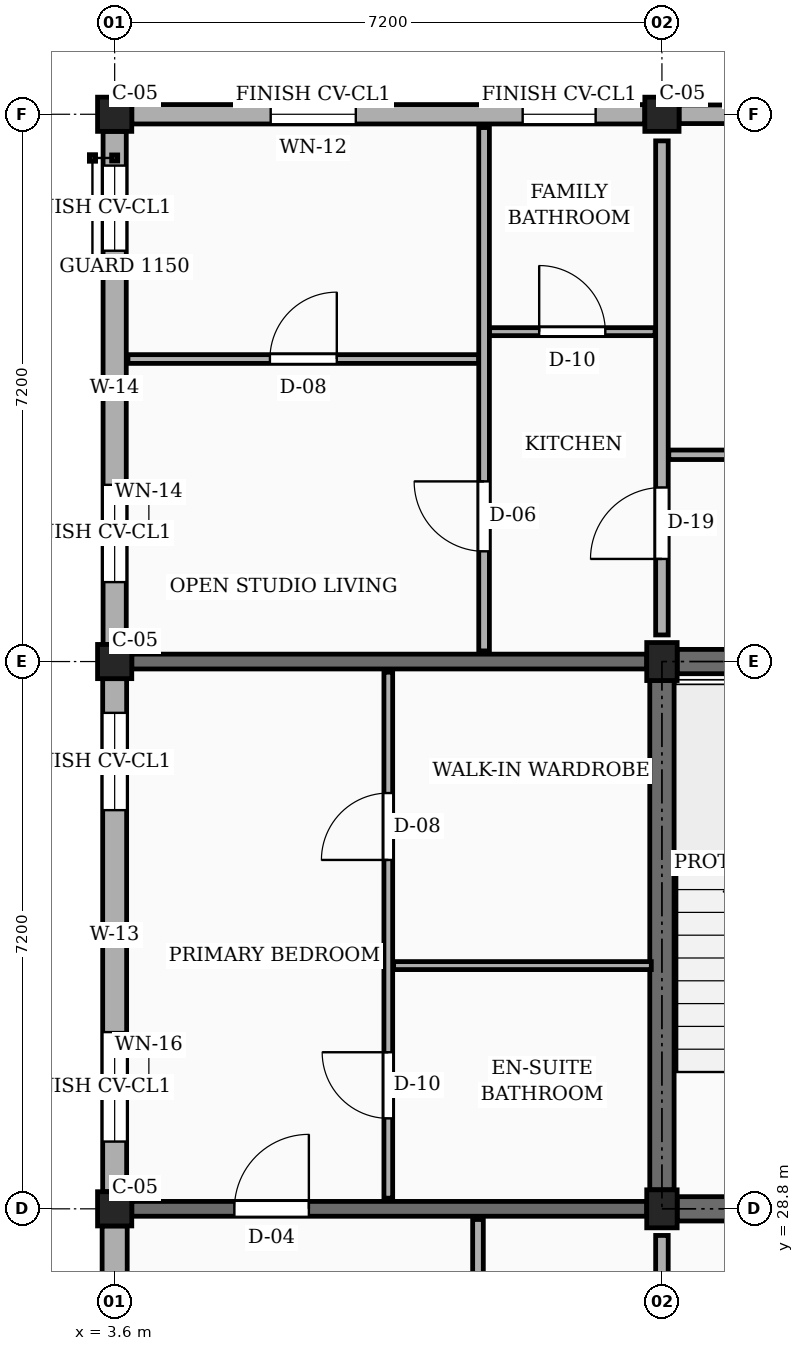
"""IFC4 building model, lengths in metres.
Left out: names, types, materials, properties, quantities, classifications, styles, units other than length and angle.
Written with IfcOpenShell. Run it as: python <this file> out.ifc"""

import sys

from ifc_helpers import new_model, si_unit, direction, frame, frame_2d, origin, origin_2d, place, context, subcontext, project, spatial, rectangle, extrude, element, fill, save


model = new_model("IFC4")
c1 = context("Model", 3, precision=1e-05, world=origin(), true_north=direction((0.0, 1.0)))
c2 = subcontext(c1, "Body", "Model", "MODEL_VIEW")
j1 = project(units=[si_unit("LENGTHUNIT", "METRE"), si_unit("PLANEANGLEUNIT", "RADIAN")], contexts=[c1])
p1 = place(None, origin())
s1 = spatial("IfcSite", under=j1, at=p1, CompositionType="ELEMENT")
p2 = place(p1, origin())
s2 = spatial("IfcBuilding", under=s1, at=p2, CompositionType="ELEMENT")
p3 = place(p2, frame((0.0, 0.0, 39.15)))
s3 = spatial("IfcBuildingStorey", under=s2, at=p3, CompositionType="ELEMENT", Elevation=39.15)
for number, where, z_axis, x_axis in (
    (1, (3.6, 28.8, 0.0), (0.0, 0.0, 1.0), (1.0, 0.0, 0.0)),
    (2, (3.6, 36.0, 0.0), (0.0, 0.0, 1.0), (1.0, 0.0, 0.0)),
    (3, (3.6, 43.2, 0.0), (0.0, 0.0, 1.0), (1.0, 0.0, 0.0)),
):
    element("IfcColumn", number, at=place(p3, frame(where, z_axis=z_axis, x_axis=x_axis)), inside=s3, PredefinedType="COLUMN", context=c2, shape_type="SweptSolid", body=[
        extrude(rectangle(XDim=0.45, YDim=0.45, at=origin_2d()), origin(), (0.0, 0.0, 1.0), 3.15),
    ])
for number, where, z_axis, x_axis in (
    (4, (10.8, 28.8, 0.0), (0.0, 0.0, 1.0), (1.0, 0.0, 0.0)),
    (5, (10.8, 36.0, 0.0), (0.0, 0.0, 1.0), (1.0, 0.0, 0.0)),
):
    element("IfcColumn", number, at=place(p3, frame(where, z_axis=z_axis, x_axis=x_axis)), inside=s3, PredefinedType="COLUMN", context=c2, shape_type="SweptSolid", body=[
        extrude(rectangle(XDim=0.4, YDim=0.5, at=origin_2d()), origin(), (0.0, 0.0, 1.0), 3.15),
    ])
p4 = place(p3, frame((10.8, 43.2, 0.0), z_axis=(0.0, 0.0, 1.0), x_axis=(1.0, 0.0, 0.0)))
e6 = element("IfcColumn", 6, at=p4, inside=s3, PredefinedType="COLUMN", context=c2, shape_type="SweptSolid", body=[
    extrude(rectangle(XDim=0.45, YDim=0.45, at=origin_2d()), origin(), (0.0, 0.0, 1.0), 3.15),
])
p5 = place(p3, frame((3.825, 28.8, 0.0), z_axis=(0.0, 0.0, 1.0), x_axis=(1.0, 0.0, 0.0)))
e7 = element("IfcWall", 7, at=p5, inside=s3, PredefinedType="SOLIDWALL", context=c2, shape_type="SweptSolid", body=[
    extrude(rectangle(XDim=6.775, YDim=0.195, at=frame_2d((3.388, 0.0))), origin(), (0.0, 0.0, 1.0), 2.17),
])
p6 = place(p5, frame((1.35, 0.0, 0.0)))
e8 = element("IfcOpeningElement", 8, at=p6, cuts=e7, PredefinedType="OPENING", context=c2, shape_type="SweptSolid", body=[
    extrude(rectangle(XDim=0.98, YDim=2.12, at=frame_2d((0.49, 1.06))), frame((0.0, 0.107, 0.0), z_axis=(0.0, -1.0, 0.0), x_axis=(1.0, 0.0, 0.0)), (0.0, 0.0, 1.0), 0.215),
])
p7 = place(p3, frame((3.825, 36.0, 0.0), z_axis=(0.0, 0.0, 1.0), x_axis=(1.0, 0.0, 0.0)))
e9 = element("IfcWall", 9, at=p7, inside=s3, PredefinedType="SOLIDWALL", context=c2, shape_type="SweptSolid", body=[
    extrude(rectangle(XDim=6.775, YDim=0.195, at=frame_2d((3.388, 0.0))), origin(), (0.0, 0.0, 1.0), 2.17),
])
p8 = place(p3, frame((17.775, 43.2, 0.0), z_axis=(0.0, 0.0, 1.0), x_axis=(-1.0, 0.0, 0.0)))
e10 = element("IfcWall", 10, at=p8, inside=s3, PredefinedType="SOLIDWALL", context=c2, shape_type="SweptSolid", body=[
    extrude(rectangle(XDim=6.75, YDim=0.245, at=frame_2d((3.375, 0.0))), origin(), (0.0, 0.0, 1.0), 2.44),
])
p9 = place(p8, frame((0.45, 0.0, 0.78)))
e11 = element("IfcOpeningElement", 11, at=p9, cuts=e10, PredefinedType="OPENING", context=c2, shape_type="SweptSolid", body=[
    extrude(rectangle(XDim=1.4, YDim=1.15, at=frame_2d((0.7, 0.575))), frame((0.0, 0.133, 0.0), z_axis=(0.0, -1.0, 0.0), x_axis=(1.0, 0.0, 0.0)), (0.0, 0.0, 1.0), 0.265),
])
p10 = place(p8, frame((4.65, 0.0, 0.78)))
e12 = element("IfcOpeningElement", 12, at=p10, cuts=e10, PredefinedType="OPENING", context=c2, shape_type="SweptSolid", body=[
    extrude(rectangle(XDim=0.96, YDim=1.26, at=frame_2d((0.48, 0.63))), frame((0.0, 0.133, 0.0), z_axis=(0.0, -1.0, 0.0), x_axis=(1.0, 0.0, 0.0)), (0.0, 0.0, 1.0), 0.265),
])
p11 = place(p3, frame((10.575, 43.2, 0.0), z_axis=(0.0, 0.0, 1.0), x_axis=(-1.0, 0.0, 0.0)))
e13 = element("IfcWall", 13, at=p11, inside=s3, PredefinedType="SOLIDWALL", context=c2, shape_type="SweptSolid", body=[
    extrude(rectangle(XDim=6.75, YDim=0.255, at=frame_2d((3.375, 0.0))), origin(), (0.0, 0.0, 1.0), 2.44),
])
p12 = place(p11, frame((0.647, 0.0, 0.78)))
e14 = element("IfcOpeningElement", 14, at=p12, cuts=e13, PredefinedType="OPENING", context=c2, shape_type="SweptSolid", body=[
    extrude(rectangle(XDim=0.96, YDim=1.26, at=frame_2d((0.48, 0.63))), frame((0.0, 0.137, 0.0), z_axis=(0.0, -1.0, 0.0), x_axis=(1.0, 0.0, 0.0)), (0.0, 0.0, 1.0), 0.275),
])
p13 = place(p11, frame((3.802, 0.0, 0.78)))
e15 = element("IfcOpeningElement", 15, at=p13, cuts=e13, PredefinedType="OPENING", context=c2, shape_type="SweptSolid", body=[
    extrude(rectangle(XDim=1.12, YDim=1.26, at=frame_2d((0.56, 0.63))), frame((0.0, 0.137, 0.0), z_axis=(0.0, -1.0, 0.0), x_axis=(1.0, 0.0, 0.0)), (0.0, 0.0, 1.0), 0.275),
])
p14 = place(p3, frame((3.6, 42.975, 0.0), z_axis=(0.0, 0.0, 1.0), x_axis=(0.0, -1.0, 0.0)))
e16 = element("IfcWall", 16, at=p14, inside=s3, PredefinedType="SOLIDWALL", context=c2, shape_type="SweptSolid", body=[
    extrude(rectangle(XDim=6.75, YDim=0.305, at=frame_2d((3.375, 0.0))), origin(), (0.0, 0.0, 1.0), 2.44),
])
p15 = place(p14, frame((0.45, 0.0, 0.78)))
e17 = element("IfcOpeningElement", 17, at=p15, cuts=e16, PredefinedType="OPENING", context=c2, shape_type="SweptSolid", body=[
    extrude(rectangle(XDim=1.12, YDim=1.26, at=frame_2d((0.56, 0.63))), frame((0.0, 0.163, 0.0), z_axis=(0.0, -1.0, 0.0), x_axis=(1.0, 0.0, 0.0)), (0.0, 0.0, 1.0), 0.325),
])
p16 = place(p14, frame((4.65, 0.0, 0.78)))
e18 = element("IfcOpeningElement", 18, at=p16, cuts=e16, PredefinedType="OPENING", context=c2, shape_type="SweptSolid", body=[
    extrude(rectangle(XDim=1.28, YDim=1.26, at=frame_2d((0.64, 0.63))), frame((0.0, 0.163, 0.0), z_axis=(0.0, -1.0, 0.0), x_axis=(1.0, 0.0, 0.0)), (0.0, 0.0, 1.0), 0.325),
])
p17 = place(p3, frame((3.6, 35.775, 0.0), z_axis=(0.0, 0.0, 1.0), x_axis=(0.0, -1.0, 0.0)))
e19 = element("IfcWall", 19, at=p17, inside=s3, PredefinedType="SOLIDWALL", context=c2, shape_type="SweptSolid", body=[
    extrude(rectangle(XDim=6.75, YDim=0.315, at=frame_2d((3.375, 0.0))), origin(), (0.0, 0.0, 1.0), 2.44),
])
p18 = place(p17, frame((0.45, 0.0, 0.78)))
e20 = element("IfcOpeningElement", 20, at=p18, cuts=e19, PredefinedType="OPENING", context=c2, shape_type="SweptSolid", body=[
    extrude(rectangle(XDim=1.28, YDim=1.26, at=frame_2d((0.64, 0.63))), frame((0.0, 0.167, 0.0), z_axis=(0.0, -1.0, 0.0), x_axis=(1.0, 0.0, 0.0)), (0.0, 0.0, 1.0), 0.335),
])
p19 = place(p17, frame((4.65, 0.0, 0.78)))
e21 = element("IfcOpeningElement", 21, at=p19, cuts=e19, PredefinedType="OPENING", context=c2, shape_type="SweptSolid", body=[
    extrude(rectangle(XDim=1.44, YDim=1.26, at=frame_2d((0.72, 0.63))), frame((0.0, 0.167, 0.0), z_axis=(0.0, -1.0, 0.0), x_axis=(1.0, 0.0, 0.0)), (0.0, 0.0, 1.0), 0.335),
])
p20 = place(p3, frame((3.6, 28.575, 0.0), z_axis=(0.0, 0.0, 1.0), x_axis=(0.0, -1.0, 0.0)))
e22 = element("IfcWall", 22, at=p20, inside=s3, PredefinedType="SOLIDWALL", context=c2, shape_type="SweptSolid", body=[
    extrude(rectangle(XDim=3.955, YDim=0.33, at=frame_2d((1.978, 0.0))), origin(), (0.0, 0.0, 1.0), 2.44),
])
p21 = place(p20, frame((0.782, 0.0, 0.78)))
e23 = element("IfcOpeningElement", 23, at=p21, cuts=e22, PredefinedType="OPENING", context=c2, shape_type="SweptSolid", body=[
    extrude(rectangle(XDim=1.44, YDim=1.26, at=frame_2d((0.72, 0.63))), frame((0.0, 0.175, 0.0), z_axis=(0.0, -1.0, 0.0), x_axis=(1.0, 0.0, 0.0)), (0.0, 0.0, 1.0), 0.35),
])
p22 = place(p3, frame((10.8, 29.05, 0.0), z_axis=(0.0, 0.0, 1.0), x_axis=(0.0, 1.0, 0.0)))
e24 = element("IfcWall", 24, at=p22, inside=s3, PredefinedType="SHEAR", context=c2, shape_type="SweptSolid", body=[
    extrude(rectangle(XDim=6.7, YDim=0.32, at=frame_2d((3.35, 0.0))), origin(), (0.0, 0.0, 1.0), 2.87),
])
for number, where, z_axis, x_axis in (
    (25, (11.0, 36.0, 0.0), (0.0, 0.0, 1.0), (1.0, 0.0, 0.0)),
    (26, (11.0, 28.8, 0.0), (0.0, 0.0, 1.0), (1.0, 0.0, 0.0)),
):
    element("IfcWall", number, at=place(p3, frame(where, z_axis=z_axis, x_axis=x_axis)), inside=s3, PredefinedType="SHEAR", context=c2, shape_type="SweptSolid", body=[
        extrude(rectangle(XDim=6.8, YDim=0.32, at=frame_2d((3.4, 0.0))), origin(), (0.0, 0.0, 1.0), 2.87),
    ])
p23 = place(p3, frame((10.8, 21.95, 0.0), z_axis=(0.0, 0.0, 1.0), x_axis=(0.0, 1.0, 0.0)))
e27 = element("IfcWall", 27, at=p23, inside=s3, PredefinedType="PARTITIONING", context=c2, shape_type="SweptSolid", body=[
    extrude(rectangle(XDim=6.5, YDim=0.165, at=frame_2d((3.25, 0.0))), origin(), (0.0, 0.0, 1.0), 2.305),
])
p24 = place(p23, frame((1.0, 0.0, 0.0)))
e28 = element("IfcOpeningElement", 28, at=p24, cuts=e27, PredefinedType="OPENING", context=c2, shape_type="SweptSolid", body=[
    extrude(rectangle(XDim=1.0, YDim=2.15, at=frame_2d((0.5, 1.075))), frame((0.0, 0.093, 0.0), z_axis=(0.0, -1.0, 0.0), x_axis=(1.0, 0.0, 0.0)), (0.0, 0.0, 1.0), 0.185),
])
p25 = place(p3, frame((10.8, 36.35, 0.0), z_axis=(0.0, 0.0, 1.0), x_axis=(0.0, 1.0, 0.0)))
e29 = element("IfcWall", 29, at=p25, inside=s3, PredefinedType="PARTITIONING", context=c2, shape_type="SweptSolid", body=[
    extrude(rectangle(XDim=6.5, YDim=0.165, at=frame_2d((3.25, 0.0))), origin(), (0.0, 0.0, 1.0), 2.305),
])
p26 = place(p25, frame((1.0, 0.0, 0.0)))
e30 = element("IfcOpeningElement", 30, at=p26, cuts=e29, PredefinedType="OPENING", context=c2, shape_type="SweptSolid", body=[
    extrude(rectangle(XDim=0.94, YDim=2.12, at=frame_2d((0.47, 1.06))), frame((0.0, 0.093, 0.0), z_axis=(0.0, -1.0, 0.0), x_axis=(1.0, 0.0, 0.0)), (0.0, 0.0, 1.0), 0.185),
])
p27 = place(p3, frame((8.38, 21.74, 0.0), z_axis=(0.0, 0.0, 1.0), x_axis=(0.0, 1.0, 0.0)))
e31 = element("IfcWall", 31, at=p27, inside=s3, PredefinedType="PARTITIONING", context=c2, shape_type="SweptSolid", body=[
    extrude(rectangle(XDim=6.92, YDim=0.14, at=frame_2d((3.46, 0.0))), origin(), (0.0, 0.0, 1.0), 2.305),
])
p28 = place(p27, frame((1.31, 0.0, 0.0)))
e32 = element("IfcOpeningElement", 32, at=p28, cuts=e31, PredefinedType="OPENING", context=c2, shape_type="SweptSolid", body=[
    extrude(rectangle(XDim=0.92, YDim=2.1, at=frame_2d((0.46, 1.05))), frame((0.0, 0.08, 0.0), z_axis=(0.0, -1.0, 0.0), x_axis=(1.0, 0.0, 0.0)), (0.0, 0.0, 1.0), 0.16),
])
p29 = place(p3, frame((7.2, 28.94, 0.0), z_axis=(0.0, 0.0, 1.0), x_axis=(0.0, 1.0, 0.0)))
e33 = element("IfcWall", 33, at=p29, inside=s3, PredefinedType="PARTITIONING", context=c2, shape_type="SweptSolid", body=[
    extrude(rectangle(XDim=6.92, YDim=0.115, at=frame_2d((3.46, 0.0))), origin(), (0.0, 0.0, 1.0), 2.305),
])
p30 = place(p29, frame((1.05, 0.0, 0.0)))
e34 = element("IfcOpeningElement", 34, at=p30, cuts=e33, PredefinedType="OPENING", context=c2, shape_type="SweptSolid", body=[
    extrude(rectangle(XDim=0.87, YDim=2.05, at=frame_2d((0.435, 1.025))), frame((0.0, 0.067, 0.0), z_axis=(0.0, -1.0, 0.0), x_axis=(1.0, 0.0, 0.0)), (0.0, 0.0, 1.0), 0.135),
])
p31 = place(p29, frame((4.45, 0.0, 0.0)))
e35 = element("IfcOpeningElement", 35, at=p31, cuts=e33, PredefinedType="OPENING", context=c2, shape_type="SweptSolid", body=[
    extrude(rectangle(XDim=0.88, YDim=2.08, at=frame_2d((0.44, 1.04))), frame((0.0, 0.067, 0.0), z_axis=(0.0, -1.0, 0.0), x_axis=(1.0, 0.0, 0.0)), (0.0, 0.0, 1.0), 0.135),
])
p32 = place(p3, frame((7.27, 32.0, 0.0), z_axis=(0.0, 0.0, 1.0), x_axis=(1.0, 0.0, 0.0)))
e36 = element("IfcWall", 36, at=p32, inside=s3, PredefinedType="PARTITIONING", context=c2, shape_type="SweptSolid", body=[
    extrude(rectangle(XDim=3.39, YDim=0.105, at=frame_2d((1.695, 0.0))), origin(), (0.0, 0.0, 1.0), 2.305),
])
p33 = place(p3, frame((10.89, 38.72, 0.0), z_axis=(0.0, 0.0, 1.0), x_axis=(1.0, 0.0, 0.0)))
e37 = element("IfcWall", 37, at=p33, inside=s3, PredefinedType="PARTITIONING", context=c2, shape_type="SweptSolid", body=[
    extrude(rectangle(XDim=7.02, YDim=0.125, at=frame_2d((3.51, 0.0))), origin(), (0.0, 0.0, 1.0), 2.305),
])
p34 = place(p33, frame((2.85, 0.0, 0.0)))
e38 = element("IfcOpeningElement", 38, at=p34, cuts=e37, PredefinedType="OPENING", context=c2, shape_type="SweptSolid", body=[
    extrude(rectangle(XDim=1.02, YDim=2.15, at=frame_2d((0.51, 1.075))), frame((0.0, 0.073, 0.0), z_axis=(0.0, -1.0, 0.0), x_axis=(1.0, 0.0, 0.0)), (0.0, 0.0, 1.0), 0.145),
])
p35 = place(p3, frame((3.775, 39.98, 0.0), z_axis=(0.0, 0.0, 1.0), x_axis=(1.0, 0.0, 0.0)))
e39 = element("IfcWall", 39, at=p35, inside=s3, PredefinedType="PARTITIONING", context=c2, shape_type="SweptSolid", body=[
    extrude(rectangle(XDim=4.615, YDim=0.115, at=frame_2d((2.308, 0.0))), origin(), (0.0, 0.0, 1.0), 2.305),
])
p36 = place(p35, frame((1.867, 0.0, 0.0)))
e40 = element("IfcOpeningElement", 40, at=p36, cuts=e39, PredefinedType="OPENING", context=c2, shape_type="SweptSolid", body=[
    extrude(rectangle(XDim=0.88, YDim=2.08, at=frame_2d((0.44, 1.04))), frame((0.0, 0.067, 0.0), z_axis=(0.0, -1.0, 0.0), x_axis=(1.0, 0.0, 0.0)), (0.0, 0.0, 1.0), 0.135),
])
p37 = place(p3, frame((8.53, 40.34, 0.0), z_axis=(0.0, 0.0, 1.0), x_axis=(1.0, 0.0, 0.0)))
e41 = element("IfcWall", 41, at=p37, inside=s3, PredefinedType="PARTITIONING", context=c2, shape_type="SweptSolid", body=[
    extrude(rectangle(XDim=2.18, YDim=0.105, at=frame_2d((1.09, 0.0))), origin(), (0.0, 0.0, 1.0), 2.305),
])
p38 = place(p37, frame((0.655, 0.0, 0.0)))
e42 = element("IfcOpeningElement", 42, at=p38, cuts=e41, PredefinedType="OPENING", context=c2, shape_type="SweptSolid", body=[
    extrude(rectangle(XDim=0.87, YDim=2.05, at=frame_2d((0.435, 1.025))), frame((0.0, 0.062, 0.0), z_axis=(0.0, -1.0, 0.0), x_axis=(1.0, 0.0, 0.0)), (0.0, 0.0, 1.0), 0.125),
])
p39 = place(p3, frame((8.46, 36.14, 0.0), z_axis=(0.0, 0.0, 1.0), x_axis=(0.0, 1.0, 0.0)))
e43 = element("IfcWall", 43, at=p39, inside=s3, PredefinedType="PARTITIONING", context=c2, shape_type="SweptSolid", body=[
    extrude(rectangle(XDim=6.885, YDim=0.14, at=frame_2d((3.442, 0.0))), origin(), (0.0, 0.0, 1.0), 2.305),
])
p40 = place(p39, frame((1.31, 0.0, 0.0)))
e44 = element("IfcOpeningElement", 44, at=p40, cuts=e43, PredefinedType="OPENING", context=c2, shape_type="SweptSolid", body=[
    extrude(rectangle(XDim=0.92, YDim=2.1, at=frame_2d((0.46, 1.05))), frame((0.0, 0.08, 0.0), z_axis=(0.0, -1.0, 0.0), x_axis=(1.0, 0.0, 0.0)), (0.0, 0.0, 1.0), 0.16),
])
p41 = place(p12, origin())
e45 = element("IfcWindow", 45, at=p41, inside=s3, PartitioningType="SINGLE_PANEL", PredefinedType="WINDOW", context=c2, shape_type="SweptSolid", body=[
    extrude(rectangle(XDim=0.96, YDim=1.26, at=frame_2d((0.48, 0.63))), frame((0.0, 0.03, 0.0), z_axis=(0.0, -1.0, 0.0), x_axis=(1.0, 0.0, 0.0)), (0.0, 0.0, 1.0), 0.06),
])
fill(e14, e45)
p42 = place(p13, origin())
e46 = element("IfcWindow", 46, at=p42, inside=s3, PartitioningType="SINGLE_PANEL", PredefinedType="WINDOW", context=c2, shape_type="SweptSolid", body=[
    extrude(rectangle(XDim=1.12, YDim=1.26, at=frame_2d((0.56, 0.63))), frame((0.0, 0.03, 0.0), z_axis=(0.0, -1.0, 0.0), x_axis=(1.0, 0.0, 0.0)), (0.0, 0.0, 1.0), 0.06),
])
fill(e15, e46)
p43 = place(p15, origin())
e47 = element("IfcWindow", 47, at=p43, inside=s3, PartitioningType="SINGLE_PANEL", PredefinedType="WINDOW", context=c2, shape_type="SweptSolid", body=[
    extrude(rectangle(XDim=1.12, YDim=1.26, at=frame_2d((0.56, 0.63))), frame((0.0, 0.03, 0.0), z_axis=(0.0, -1.0, 0.0), x_axis=(1.0, 0.0, 0.0)), (0.0, 0.0, 1.0), 0.06),
])
fill(e17, e47)
p44 = place(p16, origin())
e48 = element("IfcWindow", 48, at=p44, inside=s3, PartitioningType="SINGLE_PANEL", PredefinedType="WINDOW", context=c2, shape_type="SweptSolid", body=[
    extrude(rectangle(XDim=1.28, YDim=1.26, at=frame_2d((0.64, 0.63))), frame((0.0, 0.03, 0.0), z_axis=(0.0, -1.0, 0.0), x_axis=(1.0, 0.0, 0.0)), (0.0, 0.0, 1.0), 0.06),
])
fill(e18, e48)
p45 = place(p18, origin())
e49 = element("IfcWindow", 49, at=p45, inside=s3, PartitioningType="SINGLE_PANEL", PredefinedType="WINDOW", context=c2, shape_type="SweptSolid", body=[
    extrude(rectangle(XDim=1.28, YDim=1.26, at=frame_2d((0.64, 0.63))), frame((0.0, 0.03, 0.0), z_axis=(0.0, -1.0, 0.0), x_axis=(1.0, 0.0, 0.0)), (0.0, 0.0, 1.0), 0.06),
])
fill(e20, e49)
p46 = place(p19, origin())
e50 = element("IfcWindow", 50, at=p46, inside=s3, PartitioningType="SINGLE_PANEL", PredefinedType="WINDOW", context=c2, shape_type="SweptSolid", body=[
    extrude(rectangle(XDim=1.44, YDim=1.26, at=frame_2d((0.72, 0.63))), frame((0.0, 0.03, 0.0), z_axis=(0.0, -1.0, 0.0), x_axis=(1.0, 0.0, 0.0)), (0.0, 0.0, 1.0), 0.06),
])
fill(e21, e50)
p47 = place(p26, origin())
e51 = element("IfcDoor", 51, at=p47, inside=s3, OperationType="SINGLE_SWING_LEFT", PredefinedType="DOOR", context=c2, shape_type="SweptSolid", body=[
    extrude(rectangle(XDim=0.94, YDim=2.12, at=frame_2d((0.47, 1.06))), frame((0.0, 0.025, 0.0), z_axis=(0.0, -1.0, 0.0), x_axis=(1.0, 0.0, 0.0)), (0.0, 0.0, 1.0), 0.05),
])
fill(e30, e51)
p48 = place(p30, origin())
e52 = element("IfcDoor", 52, at=p48, inside=s3, OperationType="SINGLE_SWING_RIGHT", PredefinedType="DOOR", context=c2, shape_type="SweptSolid", body=[
    extrude(rectangle(XDim=0.87, YDim=2.05, at=frame_2d((0.435, 1.025))), frame((0.0, 0.025, 0.0), z_axis=(0.0, -1.0, 0.0), x_axis=(1.0, 0.0, 0.0)), (0.0, 0.0, 1.0), 0.05),
])
fill(e34, e52)
p49 = place(p31, origin())
e53 = element("IfcDoor", 53, at=p49, inside=s3, OperationType="SINGLE_SWING_LEFT", PredefinedType="DOOR", context=c2, shape_type="SweptSolid", body=[
    extrude(rectangle(XDim=0.88, YDim=2.08, at=frame_2d((0.44, 1.04))), frame((0.0, 0.025, 0.0), z_axis=(0.0, -1.0, 0.0), x_axis=(1.0, 0.0, 0.0)), (0.0, 0.0, 1.0), 0.05),
])
fill(e35, e53)
p50 = place(p36, origin())
e54 = element("IfcDoor", 54, at=p50, inside=s3, OperationType="SINGLE_SWING_RIGHT", PredefinedType="DOOR", context=c2, shape_type="SweptSolid", body=[
    extrude(rectangle(XDim=0.88, YDim=2.08, at=frame_2d((0.44, 1.04))), frame((0.0, 0.025, 0.0), z_axis=(0.0, -1.0, 0.0), x_axis=(1.0, 0.0, 0.0)), (0.0, 0.0, 1.0), 0.05),
])
fill(e40, e54)
p51 = place(p38, origin())
e55 = element("IfcDoor", 55, at=p51, inside=s3, OperationType="SINGLE_SWING_LEFT", PredefinedType="DOOR", context=c2, shape_type="SweptSolid", body=[
    extrude(rectangle(XDim=0.87, YDim=2.05, at=frame_2d((0.435, 1.025))), frame((0.0, 0.025, 0.0), z_axis=(0.0, -1.0, 0.0), x_axis=(1.0, 0.0, 0.0)), (0.0, 0.0, 1.0), 0.05),
])
fill(e42, e55)
p52 = place(p40, origin())
e56 = element("IfcDoor", 56, at=p52, inside=s3, OperationType="SINGLE_SWING_RIGHT", PredefinedType="DOOR", context=c2, shape_type="SweptSolid", body=[
    extrude(rectangle(XDim=0.92, YDim=2.1, at=frame_2d((0.46, 1.05))), frame((0.0, 0.025, 0.0), z_axis=(0.0, -1.0, 0.0), x_axis=(1.0, 0.0, 0.0)), (0.0, 0.0, 1.0), 0.05),
])
fill(e44, e56)
p53 = place(p6, origin())
e57 = element("IfcDoor", 57, at=p53, inside=s3, OperationType="SINGLE_SWING_RIGHT", PredefinedType="DOOR", context=c2, shape_type="SweptSolid", body=[
    extrude(rectangle(XDim=0.98, YDim=2.12, at=frame_2d((0.49, 1.06))), frame((0.0, 0.025, 0.0), z_axis=(0.0, -1.0, 0.0), x_axis=(1.0, 0.0, 0.0)), (0.0, 0.0, 1.0), 0.05),
])
fill(e8, e57)
save(model, sys.argv[1])
